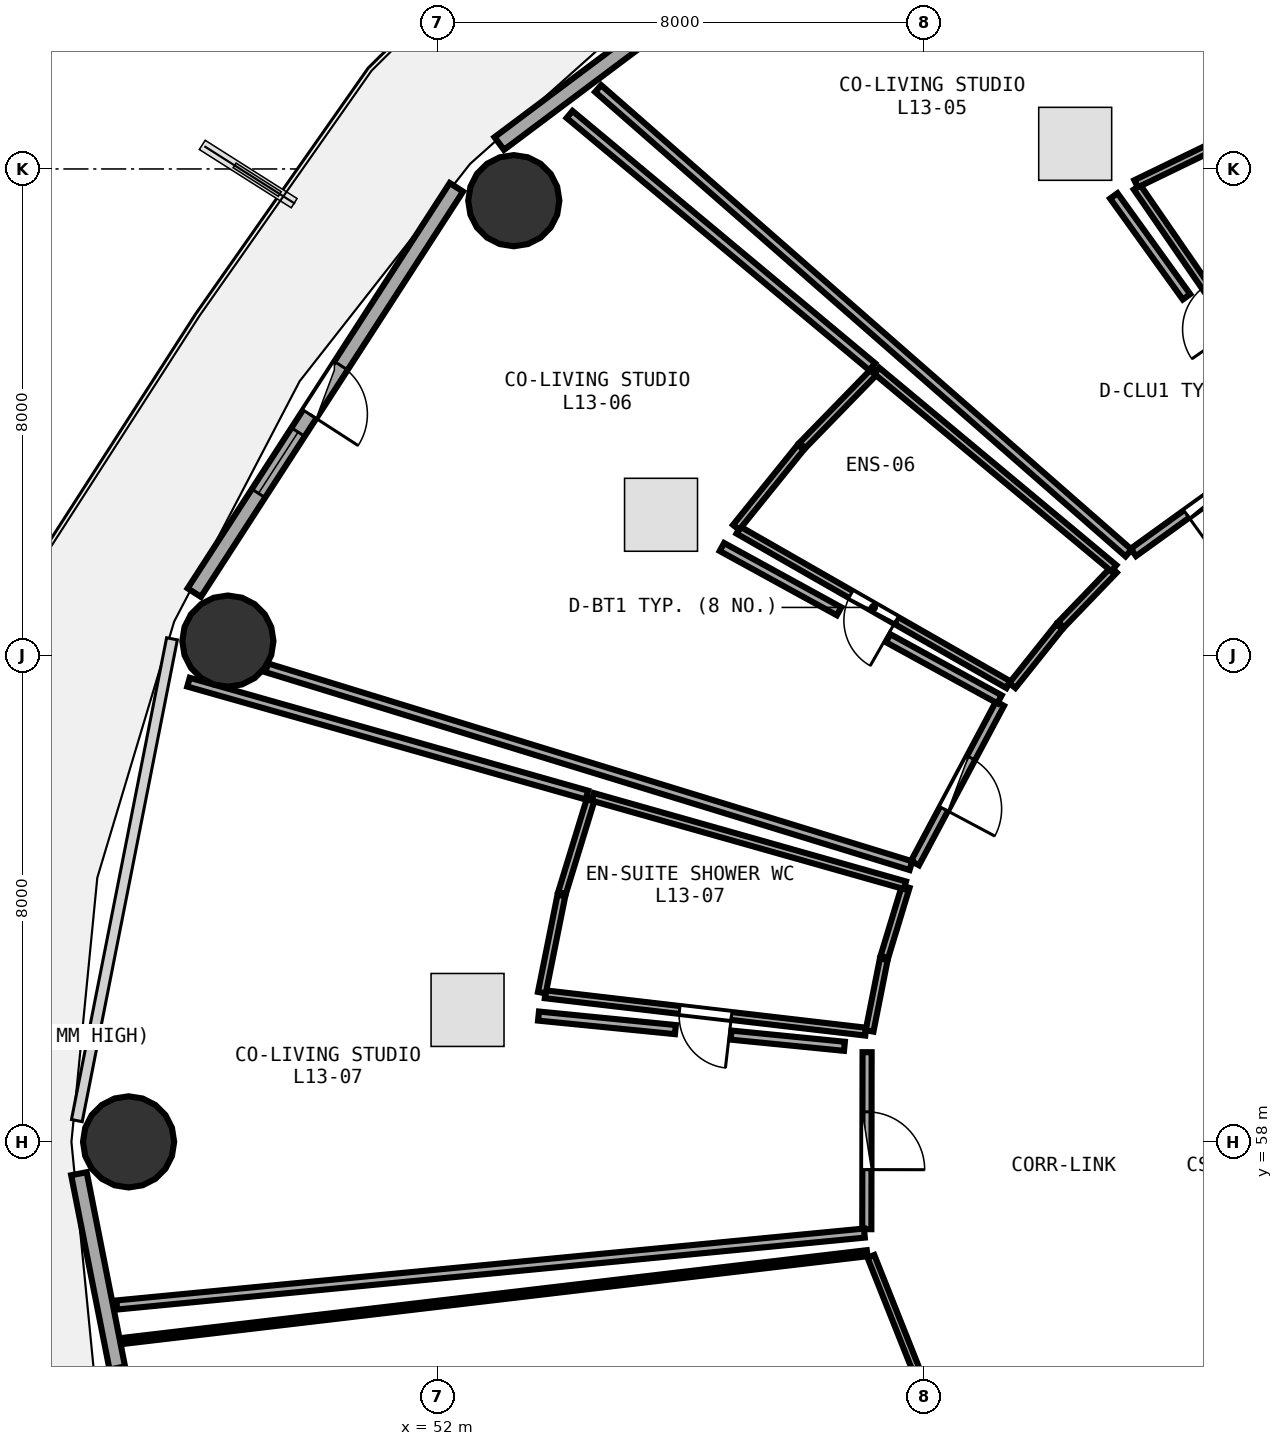
"""IFC4 building model, lengths in metres.
Left out: names, types, materials, properties, quantities, classifications, styles, units other than length and angle.
Written with IfcOpenShell. Run it as: python <this file> out.ifc"""

import sys

from ifc_helpers import new_model, si_unit, direction, frame, frame_2d, origin, origin_2d, place, context, subcontext, project, spatial, rectangle, circle, extrude, element, fill, save


model = new_model("IFC4")
c1 = context("Model", 3, precision=1e-05, world=origin(), true_north=direction((0.0, 1.0)))
c2 = subcontext(c1, "Body", "Model", "MODEL_VIEW")
j1 = project(units=[si_unit("LENGTHUNIT", "METRE"), si_unit("PLANEANGLEUNIT", "RADIAN")], contexts=[c1])
p1 = place(None, origin())
s1 = spatial("IfcSite", under=j1, at=p1, CompositionType="ELEMENT")
p2 = place(p1, origin())
s2 = spatial("IfcBuilding", under=s1, at=p2, CompositionType="ELEMENT")
p3 = place(p2, frame((0.0, 0.0, 52.5)))
s3 = spatial("IfcBuildingStorey", under=s2, at=p3, CompositionType="ELEMENT", Elevation=52.5)
for number, where, z_axis, x_axis in (
    (1, (53.256, 73.478, 0.0), (0.0, 0.0, 1.0), (1.0, 0.0, 0.0)),
    (2, (48.553, 66.236, 0.0), (0.0, 0.0, 1.0), (1.0, 0.0, 0.0)),
    (3, (46.92, 58.0, 0.0), (0.0, 0.0, 1.0), (1.0, 0.0, 0.0)),
):
    element("IfcColumn", number, at=place(p3, frame(where, z_axis=z_axis, x_axis=x_axis)), inside=s3, PredefinedType="COLUMN", context=c2, shape_type="SweptSolid", body=[
        extrude(circle(Radius=0.75, at=origin_2d()), origin(), (0.0, 0.0, 1.0), 3.75),
    ])
p4 = place(p3, frame((59.651, 79.389, 0.0), z_axis=(0.0, 0.0, 1.0), x_axis=(-0.80030733173, -0.599590005569, 0.0)))
e4 = element("IfcWall", 4, at=p4, inside=s3, PredefinedType="SOLIDWALL", context=c2, shape_type="SweptSolid", body=[
    extrude(rectangle(XDim=8.291, YDim=0.26, at=frame_2d((4.145, 0.0))), origin(), (0.0, 0.0, 1.0), 3.475),
])
p5 = place(p4, frame((3.345, 0.0, 0.85)))
e5 = element("IfcOpeningElement", 5, at=p5, cuts=e4, PredefinedType="OPENING", context=c2, shape_type="SweptSolid", body=[
    extrude(rectangle(XDim=1.6, YDim=1.45, at=frame_2d((0.8, 0.725))), frame((0.0, 0.14, 0.0), z_axis=(0.0, -1.0, 0.0), x_axis=(1.0, 0.0, 0.0)), (0.0, 0.0, 1.0), 0.28),
])
p6 = place(p3, frame((52.311, 73.698, 0.0), z_axis=(0.0, 0.0, 1.0), x_axis=(-0.543005114258, -0.839729388488, 0.0)))
e6 = element("IfcWall", 6, at=p6, inside=s3, PredefinedType="SOLIDWALL", context=c2, shape_type="SweptSolid", body=[
    extrude(rectangle(XDim=7.938, YDim=0.26, at=frame_2d((3.969, 0.0))), origin(), (0.0, 0.0, 1.0), 3.475),
])
p7 = place(p6, frame((3.494, 0.0, 0.0)))
e7 = element("IfcOpeningElement", 7, at=p7, cuts=e6, PredefinedType="OPENING", context=c2, shape_type="SweptSolid", body=[
    extrude(rectangle(XDim=0.95, YDim=2.1, at=frame_2d((0.475, 1.05))), frame((0.0, 0.14, 0.0), z_axis=(0.0, -1.0, 0.0), x_axis=(1.0, 0.0, 0.0)), (0.0, 0.0, 1.0), 0.28),
])
p8 = place(p6, frame((4.794, 0.0, 0.85)))
e8 = element("IfcOpeningElement", 8, at=p8, cuts=e6, PredefinedType="OPENING", context=c2, shape_type="SweptSolid", body=[
    extrude(rectangle(XDim=1.2, YDim=1.45, at=frame_2d((0.6, 0.725))), frame((0.0, 0.14, 0.0), z_axis=(0.0, -1.0, 0.0), x_axis=(1.0, 0.0, 0.0)), (0.0, 0.0, 1.0), 0.28),
])
p9 = place(p3, frame((46.104, 57.477, 0.0), z_axis=(0.0, 0.0, 1.0), x_axis=(0.193726159581, -0.98105564322, 0.0)))
e9 = element("IfcWall", 9, at=p9, inside=s3, PredefinedType="SOLIDWALL", context=c2, shape_type="SweptSolid", body=[
    extrude(rectangle(XDim=7.703, YDim=0.26, at=frame_2d((3.851, 0.0))), origin(), (0.0, 0.0, 1.0), 3.475),
])
p10 = place(p9, frame((3.231, 0.0, 0.85)))
e10 = element("IfcOpeningElement", 10, at=p10, cuts=e9, PredefinedType="OPENING", context=c2, shape_type="SweptSolid", body=[
    extrude(rectangle(XDim=1.6, YDim=1.45, at=frame_2d((0.8, 0.725))), frame((0.0, 0.14, 0.0), z_axis=(0.0, -1.0, 0.0), x_axis=(1.0, 0.0, 0.0)), (0.0, 0.0, 1.0), 0.28),
])
p11 = place(p3, frame((66.235, 69.738, 0.0), z_axis=(0.0, 0.0, 1.0), x_axis=(-0.567426867042, 0.823423797664, 0.0)))
e11 = element("IfcWall", 11, at=p11, inside=s3, PredefinedType="PLUMBINGWALL", context=c2, shape_type="SweptSolid", body=[
    extrude(rectangle(XDim=4.809, YDim=0.13, at=frame_2d((2.405, 0.0))), origin(), (0.0, 0.0, 1.0), 3.175),
])
p12 = place(p11, frame((1.975, 0.0, 0.0)))
e12 = element("IfcOpeningElement", 12, at=p12, cuts=e11, PredefinedType="OPENING", context=c2, shape_type="SweptSolid", body=[
    extrude(rectangle(XDim=0.86, YDim=2.05, at=frame_2d((0.43, 1.025))), frame((0.0, 0.075, 0.0), z_axis=(0.0, -1.0, 0.0), x_axis=(1.0, 0.0, 0.0)), (0.0, 0.0, 1.0), 0.15),
])
p13 = place(p3, frame((65.963, 69.511, 0.0), z_axis=(0.0, 0.0, 1.0), x_axis=(-0.811021116066, -0.585016879496, 0.0)))
e13 = element("IfcWall", 13, at=p13, inside=s3, PredefinedType="PARTITIONING", context=c2, shape_type="SweptSolid", body=[
    extrude(rectangle(XDim=3.106, YDim=0.15, at=frame_2d((1.553, 0.0))), origin(), (0.0, 0.0, 1.0), 2.875),
])
p14 = place(p13, frame((1.078, 0.0, 0.0)))
e14 = element("IfcOpeningElement", 14, at=p14, cuts=e13, PredefinedType="OPENING", context=c2, shape_type="SweptSolid", body=[
    extrude(rectangle(XDim=0.95, YDim=2.08, at=frame_2d((0.475, 1.04))), frame((0.0, 0.085, 0.0), z_axis=(0.0, -1.0, 0.0), x_axis=(1.0, 0.0, 0.0)), (0.0, 0.0, 1.0), 0.17),
])
p15 = place(p3, frame((61.39, 65.519, 0.0), z_axis=(0.0, 0.0, 1.0), x_axis=(-0.867813964862, 0.496889245598, 0.0)))
e15 = element("IfcWall", 15, at=p15, inside=s3, PredefinedType="PLUMBINGWALL", context=c2, shape_type="SweptSolid", body=[
    extrude(rectangle(XDim=5.115, YDim=0.13, at=frame_2d((2.557, 0.0))), origin(), (0.0, 0.0, 1.0), 2.875),
])
p16 = place(p15, frame((2.127, 0.0, 0.0)))
e16 = element("IfcOpeningElement", 16, at=p16, cuts=e15, PredefinedType="OPENING", context=c2, shape_type="SweptSolid", body=[
    extrude(rectangle(XDim=0.86, YDim=2.05, at=frame_2d((0.43, 1.025))), frame((0.0, 0.075, 0.0), z_axis=(0.0, -1.0, 0.0), x_axis=(1.0, 0.0, 0.0)), (0.0, 0.0, 1.0), 0.15),
])
p17 = place(p3, frame((61.251, 65.206, 0.0), z_axis=(0.0, 0.0, 1.0), x_axis=(-0.470332327533, -0.882489377657, 0.0)))
e17 = element("IfcWall", 17, at=p17, inside=s3, PredefinedType="PARTITIONING", context=c2, shape_type="SweptSolid", body=[
    extrude(rectangle(XDim=2.971, YDim=0.15, at=frame_2d((1.486, 0.0))), origin(), (0.0, 0.0, 1.0), 2.875),
])
p18 = place(p17, frame((1.011, 0.0, 0.0)))
e18 = element("IfcOpeningElement", 18, at=p18, cuts=e17, PredefinedType="OPENING", context=c2, shape_type="SweptSolid", body=[
    extrude(rectangle(XDim=0.95, YDim=2.08, at=frame_2d((0.475, 1.04))), frame((0.0, 0.085, 0.0), z_axis=(0.0, -1.0, 0.0), x_axis=(1.0, 0.0, 0.0)), (0.0, 0.0, 1.0), 0.17),
])
p19 = place(p3, frame((59.043, 59.813, 0.0), z_axis=(0.0, 0.0, 1.0), x_axis=(-0.99328280677, 0.115711994952, 0.0)))
e19 = element("IfcWall", 19, at=p19, inside=s3, PredefinedType="PLUMBINGWALL", context=c2, shape_type="SweptSolid", body=[
    extrude(rectangle(XDim=5.306, YDim=0.13, at=frame_2d((2.653, 0.0))), origin(), (0.0, 0.0, 1.0), 3.175),
])
p20 = place(p19, frame((2.223, 0.0, 0.0)))
e20 = element("IfcOpeningElement", 20, at=p20, cuts=e19, PredefinedType="OPENING", context=c2, shape_type="SweptSolid", body=[
    extrude(rectangle(XDim=0.86, YDim=2.05, at=frame_2d((0.43, 1.025))), frame((0.0, 0.075, 0.0), z_axis=(0.0, -1.0, 0.0), x_axis=(1.0, 0.0, 0.0)), (0.0, 0.0, 1.0), 0.15),
])
p21 = place(p3, frame((59.066, 59.475, 0.0), z_axis=(0.0, 0.0, 1.0), x_axis=(-0.001677287141, -0.999998593353, 0.0)))
e21 = element("IfcWall", 21, at=p21, inside=s3, PredefinedType="PARTITIONING", context=c2, shape_type="SweptSolid", body=[
    extrude(rectangle(XDim=2.911, YDim=0.15, at=frame_2d((1.456, 0.0))), origin(), (0.0, 0.0, 1.0), 2.875),
])
p22 = place(p21, frame((0.981, 0.0, 0.0)))
e22 = element("IfcOpeningElement", 22, at=p22, cuts=e21, PredefinedType="OPENING", context=c2, shape_type="SweptSolid", body=[
    extrude(rectangle(XDim=0.95, YDim=2.08, at=frame_2d((0.475, 1.04))), frame((0.0, 0.085, 0.0), z_axis=(0.0, -1.0, 0.0), x_axis=(1.0, 0.0, 0.0)), (0.0, 0.0, 1.0), 0.17),
])
p23 = place(p3, frame((59.128, 56.118, 0.0), z_axis=(0.0, 0.0, 1.0), x_axis=(0.369903929858, -0.929070009566, 0.0)))
e23 = element("IfcWall", 23, at=p23, inside=s3, PredefinedType="PARTITIONING", context=c2, shape_type="SweptSolid", body=[
    extrude(rectangle(XDim=5.693, YDim=0.12, at=frame_2d((2.846, 0.0))), origin(), (0.0, 0.0, 1.0), 2.875),
])
p24 = place(p23, frame((2.396, 0.0, 0.0)))
e24 = element("IfcOpeningElement", 24, at=p24, cuts=e23, PredefinedType="OPENING", context=c2, shape_type="SweptSolid", body=[
    extrude(rectangle(XDim=0.9, YDim=2.08, at=frame_2d((0.45, 1.04))), frame((0.0, 0.07, 0.0), z_axis=(0.0, -1.0, 0.0), x_axis=(1.0, 0.0, 0.0)), (0.0, 0.0, 1.0), 0.14),
])
p25 = place(p3, frame((63.49, 73.757, 0.0), z_axis=(0.0, 0.0, 1.0), x_axis=(0.899832096889, 0.436236400829, 0.0)))
e25 = element("IfcWall", 25, at=p25, inside=s3, PredefinedType="PLUMBINGWALL", context=c2, shape_type="SweptSolid", body=[
    extrude(rectangle(XDim=1.776, YDim=0.13, at=frame_2d((0.888, 0.0))), origin(), (0.0, 0.0, 1.0), 3.48),
])
p26 = place(p3, frame((63.366, 67.685, 0.0), z_axis=(0.0, 0.0, 1.0), x_axis=(-0.752403187404, 0.658702849231, 0.0)))
e26 = element("IfcWall", 26, at=p26, inside=s3, PredefinedType="PARTITIONING", context=c2, shape_type="SweptSolid", body=[
    extrude(rectangle(XDim=11.595, YDim=0.15, at=frame_2d((5.797, 0.0))), origin(), (0.0, 0.0, 1.0), 2.875),
])
p27 = place(p3, frame((64.367, 80.884, 0.0), z_axis=(0.0, 0.0, 1.0), x_axis=(0.395282873179, -0.918559442917, 0.0)))
e27 = element("IfcWall", 27, at=p27, inside=s3, PredefinedType="PARTITIONING", context=c2, shape_type="SweptSolid", body=[
    extrude(rectangle(XDim=6.113, YDim=0.15, at=frame_2d((3.057, 0.0))), origin(), (0.0, 0.0, 1.0), 2.875),
])
p28 = place(p3, frame((63.123, 73.558, 0.0), z_axis=(0.0, 0.0, 1.0), x_axis=(0.58432672942, -0.811518498425, 0.0)))
e28 = element("IfcWall", 28, at=p28, inside=s3, PredefinedType="PARTITIONING", context=c2, shape_type="SweptSolid", body=[
    extrude(rectangle(XDim=2.046, YDim=0.15, at=frame_2d((1.023, 0.0))), origin(), (0.0, 0.0, 1.0), 3.175),
])
p29 = place(p3, frame((63.125, 67.408, 0.0), z_axis=(0.0, 0.0, 1.0), x_axis=(-0.693342211096, -0.720608477824, 0.0)))
e29 = element("IfcWall", 29, at=p29, inside=s3, PredefinedType="PLUMBINGWALL", context=c2, shape_type="SweptSolid", body=[
    extrude(rectangle(XDim=1.254, YDim=0.13, at=frame_2d((0.627, 0.0))), origin(), (0.0, 0.0, 1.0), 2.875),
])
p30 = place(p3, frame((62.229, 66.474, 0.0), z_axis=(0.0, 0.0, 1.0), x_axis=(-0.624263214868, -0.781214079854, 0.0)))
e30 = element("IfcWall", 30, at=p30, inside=s3, PredefinedType="PLUMBINGWALL", context=c2, shape_type="SweptSolid", body=[
    extrude(rectangle(XDim=1.241, YDim=0.13, at=frame_2d((0.621, 0.0))), origin(), (0.0, 0.0, 1.0), 2.875),
])
p31 = place(p3, frame((56.912, 68.106, 0.0), z_axis=(0.0, 0.0, 1.0), x_axis=(0.628152519701, 0.778090233837, 0.0)))
e31 = element("IfcWall", 31, at=p31, inside=s3, PredefinedType="PLUMBINGWALL", context=c2, shape_type="SweptSolid", body=[
    extrude(rectangle(XDim=1.693, YDim=0.13, at=frame_2d((0.847, 0.0))), origin(), (0.0, 0.0, 1.0), 3.175),
])
p32 = place(p3, frame((58.002, 69.453, 0.0), z_axis=(0.0, 0.0, 1.0), x_axis=(0.697337129747, 0.716743278641, 0.0)))
e32 = element("IfcWall", 32, at=p32, inside=s3, PredefinedType="PLUMBINGWALL", context=c2, shape_type="SweptSolid", body=[
    extrude(rectangle(XDim=1.711, YDim=0.13, at=frame_2d((0.855, 0.0))), origin(), (0.0, 0.0, 1.0), 2.875),
])
p33 = place(p3, frame((59.224, 70.681, 0.0), z_axis=(0.0, 0.0, 1.0), x_axis=(0.768509127281, -0.63983882446, 0.0)))
e33 = element("IfcWall", 33, at=p33, inside=s3, PredefinedType="PLUMBINGWALL", context=c2, shape_type="SweptSolid", body=[
    extrude(rectangle(XDim=5.074, YDim=0.13, at=frame_2d((2.537, 0.0))), origin(), (0.0, 0.0, 1.0), 3.175),
])
p34 = place(p3, frame((59.787, 62.543, 0.0), z_axis=(0.0, 0.0, 1.0), x_axis=(-0.955941269752, 0.29355798198, 0.0)))
e34 = element("IfcWall", 34, at=p34, inside=s3, PredefinedType="PARTITIONING", context=c2, shape_type="SweptSolid", body=[
    extrude(rectangle(XDim=11.083, YDim=0.15, at=frame_2d((5.542, 0.0))), origin(), (0.0, 0.0, 1.0), 3.175),
])
p35 = place(p3, frame((54.173, 74.896, 0.0), z_axis=(0.0, 0.0, 1.0), x_axis=(0.768100814479, -0.640328930157, 0.0)))
e35 = element("IfcWall", 35, at=p35, inside=s3, PredefinedType="PARTITIONING", context=c2, shape_type="SweptSolid", body=[
    extrude(rectangle(XDim=6.479, YDim=0.15, at=frame_2d((3.24, 0.0))), origin(), (0.0, 0.0, 1.0), 2.875),
])
p36 = place(p3, frame((56.678, 67.783, 0.0), z_axis=(0.0, 0.0, 1.0), x_axis=(0.876780673324, -0.480890477017, 0.0)))
e36 = element("IfcWall", 36, at=p36, inside=s3, PredefinedType="PARTITIONING", context=c2, shape_type="SweptSolid", body=[
    extrude(rectangle(XDim=2.197, YDim=0.15, at=frame_2d((1.099, 0.0))), origin(), (0.0, 0.0, 1.0), 3.175),
])
p37 = place(p3, frame((59.411, 66.283, 0.0), z_axis=(0.0, 0.0, 1.0), x_axis=(0.876772690424, -0.480905031505, 0.0)))
e37 = element("IfcWall", 37, at=p37, inside=s3, PredefinedType="PARTITIONING", context=c2, shape_type="SweptSolid", body=[
    extrude(rectangle(XDim=2.09, YDim=0.15, at=frame_2d((1.045, 0.0))), origin(), (0.0, 0.0, 1.0), 2.875),
])
p38 = place(p3, frame((59.701, 62.196, 0.0), z_axis=(0.0, 0.0, 1.0), x_axis=(-0.29128243511, -0.956637100993, 0.0)))
e38 = element("IfcWall", 38, at=p38, inside=s3, PredefinedType="PLUMBINGWALL", context=c2, shape_type="SweptSolid", body=[
    extrude(rectangle(XDim=1.206, YDim=0.13, at=frame_2d((0.603, 0.0))), origin(), (0.0, 0.0, 1.0), 3.48),
])
p39 = place(p3, frame((59.34, 61.003, 0.0), z_axis=(0.0, 0.0, 1.0), x_axis=(-0.194199574792, -0.980962040627, 0.0)))
e39 = element("IfcWall", 39, at=p39, inside=s3, PredefinedType="PLUMBINGWALL", context=c2, shape_type="SweptSolid", body=[
    extrude(rectangle(XDim=1.201, YDim=0.13, at=frame_2d((0.6, 0.0))), origin(), (0.0, 0.0, 1.0), 3.48),
])
p40 = place(p3, frame((53.717, 60.454, 0.0), z_axis=(0.0, 0.0, 1.0), x_axis=(0.196892919049, 0.98042499888, 0.0)))
e40 = element("IfcWall", 40, at=p40, inside=s3, PredefinedType="PLUMBINGWALL", context=c2, shape_type="SweptSolid", body=[
    extrude(rectangle(XDim=1.632, YDim=0.13, at=frame_2d((0.816, 0.0))), origin(), (0.0, 0.0, 1.0), 3.48),
])
p41 = place(p3, frame((54.048, 62.092, 0.0), z_axis=(0.0, 0.0, 1.0), x_axis=(0.293405839872, 0.955987977502, 0.0)))
e41 = element("IfcWall", 41, at=p41, inside=s3, PredefinedType="PLUMBINGWALL", context=c2, shape_type="SweptSolid", body=[
    extrude(rectangle(XDim=1.64, YDim=0.13, at=frame_2d((0.82, 0.0))), origin(), (0.0, 0.0, 1.0), 3.48),
])
p42 = place(p3, frame((54.554, 63.674, 0.0), z_axis=(0.0, 0.0, 1.0), x_axis=(0.962194506937, -0.272363233238, 0.0)))
e42 = element("IfcWall", 42, at=p42, inside=s3, PredefinedType="PLUMBINGWALL", context=c2, shape_type="SweptSolid", body=[
    extrude(rectangle(XDim=5.335, YDim=0.13, at=frame_2d((2.667, 0.0))), origin(), (0.0, 0.0, 1.0), 3.175),
])
p43 = place(p3, frame((59.021, 56.5, 0.0), z_axis=(0.0, 0.0, 1.0), x_axis=(-0.995408087514, -0.095722198638, 0.0)))
e43 = element("IfcWall", 43, at=p43, inside=s3, PredefinedType="PARTITIONING", context=c2, shape_type="SweptSolid", body=[
    extrude(rectangle(XDim=12.352, YDim=0.15, at=frame_2d((6.176, 0.0))), origin(), (0.0, 0.0, 1.0), 2.875),
])
p44 = place(p3, frame((47.906, 65.56, 0.0), z_axis=(0.0, 0.0, 1.0), x_axis=(0.962107451281, -0.272670592821, 0.0)))
e44 = element("IfcWall", 44, at=p44, inside=s3, PredefinedType="PARTITIONING", context=c2, shape_type="SweptSolid", body=[
    extrude(rectangle(XDim=6.811, YDim=0.15, at=frame_2d((3.406, 0.0))), origin(), (0.0, 0.0, 1.0), 2.875),
])
p45 = place(p3, frame((53.662, 60.069, 0.0), z_axis=(0.0, 0.0, 1.0), x_axis=(0.995156134458, -0.098307009162, 0.0)))
e45 = element("IfcWall", 45, at=p45, inside=s3, PredefinedType="PARTITIONING", context=c2, shape_type="SweptSolid", body=[
    extrude(rectangle(XDim=2.262, YDim=0.15, at=frame_2d((1.131, 0.0))), origin(), (0.0, 0.0, 1.0), 3.175),
])
p46 = place(p3, frame((56.829, 59.756, 0.0), z_axis=(0.0, 0.0, 1.0), x_axis=(0.995148801126, -0.098381215772, 0.0)))
e46 = element("IfcWall", 46, at=p46, inside=s3, PredefinedType="PARTITIONING", context=c2, shape_type="SweptSolid", body=[
    extrude(rectangle(XDim=1.874, YDim=0.15, at=frame_2d((0.937, 0.0))), origin(), (0.0, 0.0, 1.0), 3.48),
])
p47 = place(p3, frame((46.808, 54.725, 0.0), z_axis=(0.0, 0.0, 1.0), x_axis=(0.993128309916, 0.117030594475, 0.0)))
e47 = element("IfcWall", 47, at=p47, inside=s3, PredefinedType="PARTITIONING", context=c2, shape_type="SweptSolid", body=[
    extrude(rectangle(XDim=12.344, YDim=0.1, at=frame_2d((6.172, 0.0))), origin(), (0.0, 0.0, 1.0), 2.875),
])
p48 = place(p7, frame((0.95, 0.0, 0.0), z_axis=(0.0, 0.0, 1.0), x_axis=(-1.0, 0.0, 0.0)))
e48 = element("IfcDoor", 48, at=p48, inside=s3, OperationType="SINGLE_SWING_LEFT", PredefinedType="DOOR", context=c2, shape_type="SweptSolid", body=[
    extrude(rectangle(XDim=0.95, YDim=2.1, at=frame_2d((0.475, 1.05))), frame((0.0, 0.025, 0.0), z_axis=(0.0, -1.0, 0.0), x_axis=(1.0, 0.0, 0.0)), (0.0, 0.0, 1.0), 0.05),
])
fill(e7, e48)
p49 = place(p8, origin())
e49 = element("IfcWindow", 49, at=p49, inside=s3, PartitioningType="SINGLE_PANEL", PredefinedType="WINDOW", context=c2, shape_type="SweptSolid", body=[
    extrude(rectangle(XDim=1.2, YDim=1.45, at=frame_2d((0.6, 0.725))), frame((0.0, 0.03, 0.0), z_axis=(0.0, -1.0, 0.0), x_axis=(1.0, 0.0, 0.0)), (0.0, 0.0, 1.0), 0.06),
])
fill(e8, e49)
p50 = place(p14, origin())
e50 = element("IfcDoor", 50, at=p50, inside=s3, OperationType="SINGLE_SWING_RIGHT", PredefinedType="DOOR", context=c2, shape_type="SweptSolid", body=[
    extrude(rectangle(XDim=0.95, YDim=2.08, at=frame_2d((0.475, 1.04))), frame((0.0, 0.025, 0.0), z_axis=(0.0, -1.0, 0.0), x_axis=(1.0, 0.0, 0.0)), (0.0, 0.0, 1.0), 0.05),
])
fill(e14, e50)
p51 = place(p16, origin())
e51 = element("IfcDoor", 51, at=p51, inside=s3, OperationType="SINGLE_SWING_LEFT", PredefinedType="DOOR", context=c2, shape_type="SweptSolid", body=[
    extrude(rectangle(XDim=0.86, YDim=2.05, at=frame_2d((0.43, 1.025))), frame((0.0, 0.025, 0.0), z_axis=(0.0, -1.0, 0.0), x_axis=(1.0, 0.0, 0.0)), (0.0, 0.0, 1.0), 0.05),
])
fill(e16, e51)
p52 = place(p18, origin())
e52 = element("IfcDoor", 52, at=p52, inside=s3, OperationType="SINGLE_SWING_RIGHT", PredefinedType="DOOR", context=c2, shape_type="SweptSolid", body=[
    extrude(rectangle(XDim=0.95, YDim=2.08, at=frame_2d((0.475, 1.04))), frame((0.0, 0.025, 0.0), z_axis=(0.0, -1.0, 0.0), x_axis=(1.0, 0.0, 0.0)), (0.0, 0.0, 1.0), 0.05),
])
fill(e18, e52)
p53 = place(p20, origin())
e53 = element("IfcDoor", 53, at=p53, inside=s3, OperationType="SINGLE_SWING_LEFT", PredefinedType="DOOR", context=c2, shape_type="SweptSolid", body=[
    extrude(rectangle(XDim=0.86, YDim=2.05, at=frame_2d((0.43, 1.025))), frame((0.0, 0.025, 0.0), z_axis=(0.0, -1.0, 0.0), x_axis=(1.0, 0.0, 0.0)), (0.0, 0.0, 1.0), 0.05),
])
fill(e20, e53)
p54 = place(p22, origin())
e54 = element("IfcDoor", 54, at=p54, inside=s3, OperationType="SINGLE_SWING_RIGHT", PredefinedType="DOOR", context=c2, shape_type="SweptSolid", body=[
    extrude(rectangle(XDim=0.95, YDim=2.08, at=frame_2d((0.475, 1.04))), frame((0.0, 0.025, 0.0), z_axis=(0.0, -1.0, 0.0), x_axis=(1.0, 0.0, 0.0)), (0.0, 0.0, 1.0), 0.05),
])
fill(e22, e54)
save(model, sys.argv[1])
